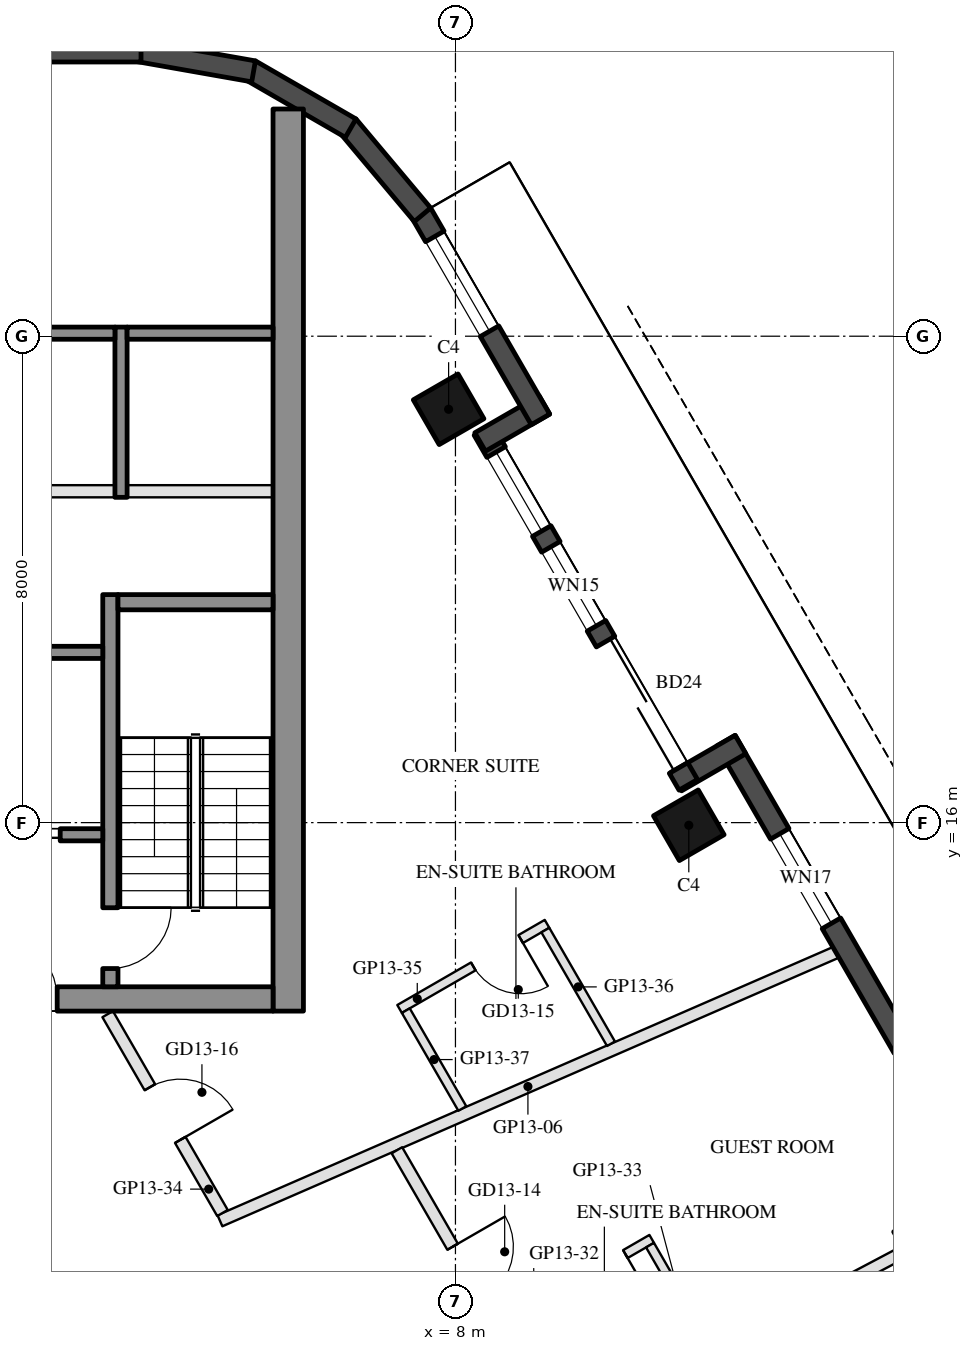
"""IFC4 building model, lengths in metres.
Left out: names, types, materials, properties, quantities, classifications, styles, units other than length and angle.
Written with IfcOpenShell. Run it as: python <this file> out.ifc"""

import sys

from ifc_helpers import new_model, si_unit, direction, frame, frame_2d, origin, origin_2d, place, context, subcontext, project, spatial, rectangle, hollow_rectangle, extrude, element, fill, save


model = new_model("IFC4")
c1 = context("Model", 3, precision=1e-05, world=origin(), true_north=direction((0.0, 1.0)))
c2 = subcontext(c1, "Body", "Model", "MODEL_VIEW")
j1 = project(units=[si_unit("LENGTHUNIT", "METRE"), si_unit("PLANEANGLEUNIT", "RADIAN")], contexts=[c1])
p1 = place(None, origin())
s1 = spatial("IfcSite", under=j1, at=p1, CompositionType="ELEMENT")
p2 = place(p1, origin())
s2 = spatial("IfcBuilding", under=s1, at=p2, CompositionType="ELEMENT")
p3 = place(p2, frame((0.0, 0.0, 157.7)))
s3 = spatial("IfcBuildingStorey", under=s2, at=p3, CompositionType="ELEMENT", Elevation=157.7)
for number, where, z_axis, x_axis in (
    (1, (15.788, 9.115, 0.0), (0.0, 0.0, 1.0), (-0.5, 0.866, 0.0)),
    (2, (11.838, 15.957, 0.0), (0.0, 0.0, 1.0), (-0.5, 0.866, 0.0)),
    (3, (7.888, 22.798, 0.0), (0.0, 0.0, 1.0), (-0.5, 0.866, 0.0)),
):
    element("IfcColumn", number, at=place(p3, frame(where, z_axis=z_axis, x_axis=x_axis)), inside=s3, PredefinedType="COLUMN", context=c2, shape_type="SweptSolid", body=[
        extrude(hollow_rectangle(XDim=0.85, YDim=0.85, WallThickness=0.04, at=origin_2d()), origin(), (0.0, 0.0, 1.0), 3.7),
    ])
p4 = place(p3, frame((17.299, 8.948, 0.0), z_axis=(0.0, 0.0, 1.0), x_axis=(-0.500010041276, 0.866019606374, 0.0)))
e4 = element("IfcWall", 4, at=p4, inside=s3, PredefinedType="SOLIDWALL", context=c2, shape_type="SweptSolid", body=[
    extrude(rectangle(XDim=9.7, YDim=0.35, at=frame_2d((4.85, 0.0))), origin(), (0.0, 0.0, 1.0), 3.55),
])
p5 = place(p4, frame((2.062, 0.0, 0.0)))
e5 = element("IfcOpeningElement", 5, at=p5, cuts=e4, PredefinedType="OPENING", context=c2, shape_type="SweptSolid", body=[
    extrude(rectangle(XDim=1.8, YDim=2.4, at=frame_2d((0.9, 1.2))), frame((0.0, 0.185, 0.0), z_axis=(0.0, -1.0, 0.0), x_axis=(1.0, 0.0, 0.0)), (0.0, 0.0, 1.0), 0.37),
])
p6 = place(p4, frame((6.23, 0.0, 0.3)))
e6 = element("IfcOpeningElement", 6, at=p6, cuts=e4, PredefinedType="OPENING", context=c2, shape_type="SweptSolid", body=[
    extrude(rectangle(XDim=1.7, YDim=2.65, at=frame_2d((0.85, 1.325))), frame((0.0, 0.185, 0.0), z_axis=(0.0, -1.0, 0.0), x_axis=(1.0, 0.0, 0.0)), (0.0, 0.0, 1.0), 0.37),
])
p7 = place(p3, frame((12.688, 17.284, 0.0), z_axis=(0.0, 0.0, 1.0), x_axis=(-0.865955602162, -0.500120880472, 0.0)))
e7 = element("IfcWall", 7, at=p7, inside=s3, PredefinedType="SOLIDWALL", context=c2, shape_type="SweptSolid", body=[
    extrude(rectangle(XDim=1.22, YDim=0.35, at=frame_2d((0.61, 0.0))), origin(), (0.0, 0.0, 1.0), 3.55),
])
p8 = place(p3, frame((11.829, 16.621, 0.0), z_axis=(0.0, 0.0, 1.0), x_axis=(-0.500003597184, 0.866023326939, 0.0)))
e8 = element("IfcWall", 8, at=p8, inside=s3, PredefinedType="SOLIDWALL", context=c2, shape_type="SweptSolid", body=[
    extrude(rectangle(XDim=6.74, YDim=0.35, at=frame_2d((3.37, 0.0))), origin(), (0.0, 0.0, 1.0), 3.55),
])
p9 = place(p8, frame((0.32, 0.0, 0.0)))
e9 = element("IfcOpeningElement", 9, at=p9, cuts=e8, PredefinedType="OPENING", context=c2, shape_type="SweptSolid", body=[
    extrude(rectangle(XDim=2.4, YDim=2.4, at=frame_2d((1.2, 1.2))), frame((0.0, 0.185, 0.0), z_axis=(0.0, -1.0, 0.0), x_axis=(1.0, 0.0, 0.0)), (0.0, 0.0, 1.0), 0.37),
])
p10 = place(p8, frame((3.02, 0.0, 0.3)))
e10 = element("IfcOpeningElement", 10, at=p10, cuts=e8, PredefinedType="OPENING", context=c2, shape_type="SweptSolid", body=[
    extrude(rectangle(XDim=1.5, YDim=2.65, at=frame_2d((0.75, 1.325))), frame((0.0, 0.185, 0.0), z_axis=(0.0, -1.0, 0.0), x_axis=(1.0, 0.0, 0.0)), (0.0, 0.0, 1.0), 0.37),
])
p11 = place(p8, frame((4.82, 0.0, 0.3)))
e11 = element("IfcOpeningElement", 11, at=p11, cuts=e8, PredefinedType="OPENING", context=c2, shape_type="SweptSolid", body=[
    extrude(rectangle(XDim=1.5, YDim=2.65, at=frame_2d((0.75, 1.325))), frame((0.0, 0.185, 0.0), z_axis=(0.0, -1.0, 0.0), x_axis=(1.0, 0.0, 0.0)), (0.0, 0.0, 1.0), 0.37),
])
p12 = place(p3, frame((8.406, 22.26, 0.0), z_axis=(0.0, 0.0, 1.0), x_axis=(0.865955602162, 0.500120880472, 0.0)))
e12 = element("IfcWall", 12, at=p12, inside=s3, PredefinedType="SOLIDWALL", context=c2, shape_type="SweptSolid", body=[
    extrude(rectangle(XDim=1.22, YDim=0.35, at=frame_2d((0.61, 0.0))), origin(), (0.0, 0.0, 1.0), 3.55),
])
p13 = place(p3, frame((9.398, 22.631, 0.0), z_axis=(0.0, 0.0, 1.0), x_axis=(-0.499954521343, 0.866051659307, 0.0)))
e13 = element("IfcWall", 13, at=p13, inside=s3, PredefinedType="SOLIDWALL", context=c2, shape_type="SweptSolid", body=[
    extrude(rectangle(XDim=3.916, YDim=0.35, at=frame_2d((1.958, 0.0))), origin(), (0.0, 0.0, 1.0), 3.55),
])
p14 = place(p13, frame((1.675, 0.0, 0.3)))
e14 = element("IfcOpeningElement", 14, at=p14, cuts=e13, PredefinedType="OPENING", context=c2, shape_type="SweptSolid", body=[
    extrude(rectangle(XDim=1.8, YDim=2.65, at=frame_2d((0.9, 1.325))), frame((0.0, 0.185, 0.0), z_axis=(0.0, -1.0, 0.0), x_axis=(1.0, 0.0, 0.0)), (0.0, 0.0, 1.0), 0.37),
])
p15 = place(p3, frame((7.458, 25.998, 0.0), z_axis=(0.0, 0.0, 1.0), x_axis=(-0.642808304945, 0.766027077259, 0.0)))
e15 = element("IfcWall", 15, at=p15, inside=s3, PredefinedType="SOLIDWALL", context=c2, shape_type="SweptSolid", body=[
    extrude(rectangle(XDim=1.91, YDim=0.35, at=frame_2d((0.955, 0.0))), origin(), (0.0, 0.0, 1.0), 3.55),
])
for number, where, z_axis, x_axis in (
    (16, (6.277, 27.422, 0.0), (0.0, 0.0, 1.0), (-0.866, 0.5, 0.0)),
    (17, (4.68, 28.356, 0.0), (0.0, 0.0, 1.0), (-0.985, 0.174, 0.0)),
):
    element("IfcWall", number, at=place(p3, frame(where, z_axis=z_axis, x_axis=x_axis)), inside=s3, PredefinedType="SOLIDWALL", context=c2, shape_type="SweptSolid", body=[
        extrude(rectangle(XDim=1.91, YDim=0.35, at=frame_2d((0.955, 0.0))), origin(), (0.0, 0.0, 1.0), 3.55),
    ])
p16 = place(p3, frame((2.829, 28.685, 0.0), z_axis=(0.0, 0.0, 1.0), x_axis=(-1.0, 0.0, 0.0)))
e18 = element("IfcWall", 18, at=p16, inside=s3, PredefinedType="SOLIDWALL", context=c2, shape_type="SweptSolid", body=[
    extrude(rectangle(XDim=5.658, YDim=0.35, at=frame_2d((2.829, 0.0))), origin(), (0.0, 0.0, 1.0), 3.55),
])
p17 = place(p3, frame((5.25, 12.9, 0.0), z_axis=(0.0, 0.0, 1.0), x_axis=(0.0, 1.0, 0.0)))
e19 = element("IfcWall", 19, at=p17, inside=s3, PredefinedType="SHEAR", context=c2, shape_type="SweptSolid", body=[
    extrude(rectangle(XDim=14.837, YDim=0.5, at=frame_2d((7.418, 0.0))), origin(), (0.0, 0.0, 1.0), 3.5),
])
p18 = place(p3, frame((5.0, 13.1, 0.0), z_axis=(0.0, 0.0, 1.0), x_axis=(-1.0, 0.0, 0.0)))
e20 = element("IfcWall", 20, at=p18, inside=s3, PredefinedType="SHEAR", context=c2, shape_type="SweptSolid", body=[
    extrude(rectangle(XDim=10.0, YDim=0.4, at=frame_2d((5.0, 0.0))), origin(), (0.0, 0.0, 1.0), 3.5),
])
p19 = place(p18, frame((3.55, 0.0, 0.0)))
e21 = element("IfcOpeningElement", 21, at=p19, cuts=e20, PredefinedType="OPENING", context=c2, shape_type="SweptSolid", body=[
    extrude(rectangle(XDim=1.1, YDim=2.1, at=frame_2d((0.55, 1.05))), frame((0.0, 0.21, 0.0), z_axis=(0.0, -1.0, 0.0), x_axis=(1.0, 0.0, 0.0)), (0.0, 0.0, 1.0), 0.42),
])
p20 = place(p18, frame((5.85, 0.0, 0.0)))
e22 = element("IfcOpeningElement", 22, at=p20, cuts=e20, PredefinedType="OPENING", context=c2, shape_type="SweptSolid", body=[
    extrude(rectangle(XDim=1.4, YDim=2.1, at=frame_2d((0.7, 1.05))), frame((0.0, 0.21, 0.0), z_axis=(0.0, -1.0, 0.0), x_axis=(1.0, 0.0, 0.0)), (0.0, 0.0, 1.0), 0.42),
])
p21 = place(p3, frame((2.325, 13.3, 0.0), z_axis=(0.0, 0.0, 1.0), x_axis=(0.0, 1.0, 0.0)))
e23 = element("IfcWall", 23, at=p21, inside=s3, PredefinedType="SHEAR", context=c2, shape_type="SweptSolid", body=[
    extrude(rectangle(XDim=6.45, YDim=0.25, at=frame_2d((3.225, 0.0))), origin(), (0.0, 0.0, 1.0), 3.5),
])
p22 = place(p21, frame((0.3, 0.0, 0.0)))
e24 = element("IfcOpeningElement", 24, at=p22, cuts=e23, PredefinedType="OPENING", context=c2, shape_type="SweptSolid", body=[
    extrude(rectangle(XDim=1.0, YDim=2.1, at=frame_2d((0.5, 1.05))), frame((0.0, 0.135, 0.0), z_axis=(0.0, -1.0, 0.0), x_axis=(1.0, 0.0, 0.0)), (0.0, 0.0, 1.0), 0.27),
])
p23 = place(p3, frame((5.0, 19.625, 0.0), z_axis=(0.0, 0.0, 1.0), x_axis=(-1.0, 0.0, 0.0)))
e25 = element("IfcWall", 25, at=p23, inside=s3, PredefinedType="SHEAR", context=c2, shape_type="SweptSolid", body=[
    extrude(rectangle(XDim=2.55, YDim=0.25, at=frame_2d((1.275, 0.0))), origin(), (0.0, 0.0, 1.0), 3.5),
])
p24 = place(p3, frame((2.2, 18.8, 0.0), z_axis=(0.0, 0.0, 1.0), x_axis=(-1.0, 0.0, 0.0)))
e26 = element("IfcWall", 26, at=p24, inside=s3, PredefinedType="SHEAR", context=c2, shape_type="SweptSolid", body=[
    extrude(rectangle(XDim=2.8, YDim=0.2, at=frame_2d((1.4, 0.0))), origin(), (0.0, 0.0, 1.0), 3.5),
])
p25 = place(p3, frame((2.2, 15.8, 0.0), z_axis=(0.0, 0.0, 1.0), x_axis=(-1.0, 0.0, 0.0)))
e27 = element("IfcWall", 27, at=p25, inside=s3, PredefinedType="SHEAR", context=c2, shape_type="SweptSolid", body=[
    extrude(rectangle(XDim=2.8, YDim=0.2, at=frame_2d((1.4, 0.0))), origin(), (0.0, 0.0, 1.0), 3.5),
])
p26 = place(p25, frame((0.7, 0.0, 0.0)))
e28 = element("IfcOpeningElement", 28, at=p26, cuts=e27, PredefinedType="OPENING", context=c2, shape_type="SweptSolid", body=[
    extrude(rectangle(XDim=1.2, YDim=2.1, at=frame_2d((0.6, 1.05))), frame((0.0, 0.11, 0.0), z_axis=(0.0, -1.0, 0.0), x_axis=(1.0, 0.0, 0.0)), (0.0, 0.0, 1.0), 0.22),
])
p27 = place(p3, frame((2.5, 21.35, 0.0), z_axis=(0.0, 0.0, 1.0), x_axis=(0.0, 1.0, 0.0)))
e29 = element("IfcWall", 29, at=p27, inside=s3, PredefinedType="SHEAR", context=c2, shape_type="SweptSolid", body=[
    extrude(rectangle(XDim=2.8, YDim=0.2, at=frame_2d((1.4, 0.0))), origin(), (0.0, 0.0, 1.0), 3.5),
])
p28 = place(p3, frame((5.0, 24.05, 0.0), z_axis=(0.0, 0.0, 1.0), x_axis=(-1.0, 0.0, 0.0)))
e30 = element("IfcWall", 30, at=p28, inside=s3, PredefinedType="SHEAR", context=c2, shape_type="SweptSolid", body=[
    extrude(rectangle(XDim=2.4, YDim=0.2, at=frame_2d((1.2, 0.0))), origin(), (0.0, 0.0, 1.0), 3.5),
])
p29 = place(p3, frame((2.4, 24.05, 0.0), z_axis=(0.0, 0.0, 1.0), x_axis=(-1.0, 0.0, 0.0)))
e31 = element("IfcWall", 31, at=p29, inside=s3, PredefinedType="SHEAR", context=c2, shape_type="SweptSolid", body=[
    extrude(rectangle(XDim=2.8, YDim=0.2, at=frame_2d((1.4, 0.0))), origin(), (0.0, 0.0, 1.0), 3.5),
])
p30 = place(p3, frame((5.0, 21.45, 0.0), z_axis=(0.0, 0.0, 1.0), x_axis=(-1.0, 0.0, 0.0)))
e32 = element("IfcWall", 32, at=p30, inside=s3, PredefinedType="PARTITIONING", context=c2, shape_type="SweptSolid", body=[
    extrude(rectangle(XDim=2.4, YDim=0.2, at=frame_2d((1.2, 0.0))), origin(), (0.0, 0.0, 1.0), 3.5),
])
p31 = place(p3, frame((2.4, 21.45, 0.0), z_axis=(0.0, 0.0, 1.0), x_axis=(-1.0, 0.0, 0.0)))
e33 = element("IfcWall", 33, at=p31, inside=s3, PredefinedType="PARTITIONING", context=c2, shape_type="SweptSolid", body=[
    extrude(rectangle(XDim=2.8, YDim=0.2, at=frame_2d((1.4, 0.0))), origin(), (0.0, 0.0, 1.0), 3.5),
])
p32 = place(p3, frame((15.392, 8.95, 0.0), z_axis=(0.0, 0.0, 1.0), x_axis=(-0.883969397176, -0.467544762408, 0.0)))
e34 = element("IfcWall", 34, at=p32, inside=s3, PredefinedType="PARTITIONING", context=c2, shape_type="SweptSolid", body=[
    extrude(rectangle(XDim=6.51, YDim=0.2, at=frame_2d((3.255, 0.0))), origin(), (0.0, 0.0, 1.0), 2.95),
])
p33 = place(p3, frame((14.257, 13.866, 0.0), z_axis=(0.0, 0.0, 1.0), x_axis=(-0.916761733334, -0.399434505638, 0.0)))
e35 = element("IfcWall", 35, at=p33, inside=s3, PredefinedType="PARTITIONING", context=c2, shape_type="SweptSolid", body=[
    extrude(rectangle(XDim=11.05, YDim=0.2, at=frame_2d((5.525, 0.0))), origin(), (0.0, 0.0, 1.0), 3.06),
])
p34 = place(p3, frame((7.037, 10.611, 0.0), z_axis=(0.0, 0.0, 1.0), x_axis=(0.500004030971, -0.86602307649, 0.0)))
e36 = element("IfcWall", 36, at=p34, inside=s3, PredefinedType="PARTITIONING", context=c2, shape_type="SweptSolid", body=[
    extrude(rectangle(XDim=5.279, YDim=0.2, at=frame_2d((2.639, 0.0))), origin(), (0.0, 0.0, 1.0), 2.95),
])
p35 = place(p34, frame((1.833, 0.0, 0.0)))
e37 = element("IfcOpeningElement", 37, at=p35, cuts=e36, PredefinedType="OPENING", context=c2, shape_type="SweptSolid", body=[
    extrude(rectangle(XDim=1.0, YDim=2.1, at=frame_2d((0.5, 1.05))), frame((0.0, 0.11, 0.0), z_axis=(0.0, -1.0, 0.0), x_axis=(1.0, 0.0, 0.0)), (0.0, 0.0, 1.0), 0.22),
])
p36 = place(p3, frame((11.227, 9.154, 0.0), z_axis=(0.0, 0.0, 1.0), x_axis=(-0.866034573852, -0.49998411664, 0.0)))
e38 = element("IfcWall", 38, at=p36, inside=s3, PredefinedType="PARTITIONING", context=c2, shape_type="SweptSolid", body=[
    extrude(rectangle(XDim=2.8, YDim=0.15, at=frame_2d((1.4, 0.0))), origin(), (0.0, 0.0, 1.0), 3.55),
])
p37 = place(p36, frame((0.5, 0.0, 0.0)))
e39 = element("IfcOpeningElement", 39, at=p37, cuts=e38, PredefinedType="OPENING", context=c2, shape_type="SweptSolid", body=[
    extrude(rectangle(XDim=0.9, YDim=2.1, at=frame_2d((0.45, 1.05))), frame((0.0, 0.085, 0.0), z_axis=(0.0, -1.0, 0.0), x_axis=(1.0, 0.0, 0.0)), (0.0, 0.0, 1.0), 0.17),
])
p38 = place(p3, frame((12.175, 7.362, 0.0), z_axis=(0.0, 0.0, 1.0), x_axis=(-0.500014901547, 0.866016800201, 0.0)))
e40 = element("IfcWall", 40, at=p38, inside=s3, PredefinedType="PARTITIONING", context=c2, shape_type="SweptSolid", body=[
    extrude(rectangle(XDim=1.951, YDim=0.15, at=frame_2d((0.976, 0.0))), origin(), (0.0, 0.0, 1.0), 3.55),
])
p39 = place(p3, frame((2.281, 12.85, 0.0), z_axis=(0.0, 0.0, 1.0), x_axis=(0.499991068497, -0.866030560329, 0.0)))
e41 = element("IfcWall", 41, at=p39, inside=s3, PredefinedType="PARTITIONING", context=c2, shape_type="SweptSolid", body=[
    extrude(rectangle(XDim=3.776, YDim=0.2, at=frame_2d((1.888, 0.0))), origin(), (0.0, 0.0, 1.0), 2.95),
])
p40 = place(p39, frame((1.388, 0.0, 0.0)))
e42 = element("IfcOpeningElement", 42, at=p40, cuts=e41, PredefinedType="OPENING", context=c2, shape_type="SweptSolid", body=[
    extrude(rectangle(XDim=1.0, YDim=2.1, at=frame_2d((0.5, 1.05))), frame((0.0, 0.11, 0.0), z_axis=(0.0, -1.0, 0.0), x_axis=(1.0, 0.0, 0.0)), (0.0, 0.0, 1.0), 0.22),
])
p41 = place(p3, frame((9.506, 14.335, 0.0), z_axis=(0.0, 0.0, 1.0), x_axis=(-0.866056369097, -0.49994636267, 0.0)))
e43 = element("IfcWall", 43, at=p41, inside=s3, PredefinedType="PARTITIONING", context=c2, shape_type="SweptSolid", body=[
    extrude(rectangle(XDim=2.8, YDim=0.15, at=frame_2d((1.4, 0.0))), origin(), (0.0, 0.0, 1.0), 3.55),
])
p42 = place(p41, frame((0.5, 0.0, 0.0)))
e44 = element("IfcOpeningElement", 44, at=p42, cuts=e43, PredefinedType="OPENING", context=c2, shape_type="SweptSolid", body=[
    extrude(rectangle(XDim=0.9, YDim=2.1, at=frame_2d((0.45, 1.05))), frame((0.0, 0.085, 0.0), z_axis=(0.0, -1.0, 0.0), x_axis=(1.0, 0.0, 0.0)), (0.0, 0.0, 1.0), 0.17),
])
p43 = place(p3, frame((10.558, 12.364, 0.0), z_axis=(0.0, 0.0, 1.0), x_axis=(-0.499983569942, 0.866034889475, 0.0)))
e45 = element("IfcWall", 45, at=p43, inside=s3, PredefinedType="PARTITIONING", context=c2, shape_type="SweptSolid", body=[
    extrude(rectangle(XDim=2.158, YDim=0.15, at=frame_2d((1.079, 0.0))), origin(), (0.0, 0.0, 1.0), 3.55),
])
p44 = place(p3, frame((8.113, 11.298, 0.0), z_axis=(0.0, 0.0, 1.0), x_axis=(-0.49995366312, 0.866052154742, 0.0)))
e46 = element("IfcWall", 46, at=p44, inside=s3, PredefinedType="PARTITIONING", context=c2, shape_type="SweptSolid", body=[
    extrude(rectangle(XDim=1.859, YDim=0.15, at=frame_2d((0.929, 0.0))), origin(), (0.0, 0.0, 1.0), 3.55),
])
p45 = place(p6, origin())
e47 = element("IfcWindow", 47, at=p45, inside=s3, PartitioningType="SINGLE_PANEL", PredefinedType="WINDOW", context=c2, shape_type="SweptSolid", body=[
    extrude(rectangle(XDim=1.7, YDim=2.65, at=frame_2d((0.85, 1.325))), frame((0.0, 0.03, 0.0), z_axis=(0.0, -1.0, 0.0), x_axis=(1.0, 0.0, 0.0)), (0.0, 0.0, 1.0), 0.06),
])
fill(e6, e47)
p46 = place(p9, frame((2.4, 0.0, 0.0), z_axis=(0.0, 0.0, 1.0), x_axis=(-1.0, 0.0, 0.0)))
e48 = element("IfcDoor", 48, at=p46, inside=s3, OperationType="SLIDING_TO_LEFT", PredefinedType="DOOR", context=c2, shape_type="SweptSolid", body=[
    extrude(rectangle(XDim=2.4, YDim=2.4, at=frame_2d((1.2, 1.2))), frame((0.0, 0.025, 0.0), z_axis=(0.0, -1.0, 0.0), x_axis=(1.0, 0.0, 0.0)), (0.0, 0.0, 1.0), 0.05),
])
fill(e9, e48)
p47 = place(p10, origin())
e49 = element("IfcWindow", 49, at=p47, inside=s3, PartitioningType="SINGLE_PANEL", PredefinedType="WINDOW", context=c2, shape_type="SweptSolid", body=[
    extrude(rectangle(XDim=1.5, YDim=2.65, at=frame_2d((0.75, 1.325))), frame((0.0, 0.03, 0.0), z_axis=(0.0, -1.0, 0.0), x_axis=(1.0, 0.0, 0.0)), (0.0, 0.0, 1.0), 0.06),
])
fill(e10, e49)
p48 = place(p11, origin())
e50 = element("IfcWindow", 50, at=p48, inside=s3, PartitioningType="SINGLE_PANEL", PredefinedType="WINDOW", context=c2, shape_type="SweptSolid", body=[
    extrude(rectangle(XDim=1.5, YDim=2.65, at=frame_2d((0.75, 1.325))), frame((0.0, 0.03, 0.0), z_axis=(0.0, -1.0, 0.0), x_axis=(1.0, 0.0, 0.0)), (0.0, 0.0, 1.0), 0.06),
])
fill(e11, e50)
p49 = place(p14, origin())
e51 = element("IfcWindow", 51, at=p49, inside=s3, PartitioningType="SINGLE_PANEL", PredefinedType="WINDOW", context=c2, shape_type="SweptSolid", body=[
    extrude(rectangle(XDim=1.8, YDim=2.65, at=frame_2d((0.9, 1.325))), frame((0.0, 0.03, 0.0), z_axis=(0.0, -1.0, 0.0), x_axis=(1.0, 0.0, 0.0)), (0.0, 0.0, 1.0), 0.06),
])
fill(e14, e51)
p50 = place(p26, origin())
e52 = element("IfcDoor", 52, at=p50, inside=s3, OperationType="DOUBLE_DOOR_SLIDING", PredefinedType="DOOR", context=c2, shape_type="SweptSolid", body=[
    extrude(rectangle(XDim=1.2, YDim=2.1, at=frame_2d((0.6, 1.05))), frame((0.0, 0.025, 0.0), z_axis=(0.0, -1.0, 0.0), x_axis=(1.0, 0.0, 0.0)), (0.0, 0.0, 1.0), 0.05),
])
fill(e28, e52)
p51 = place(p19, frame((1.1, 0.0, 0.0), z_axis=(0.0, 0.0, 1.0), x_axis=(-1.0, 0.0, 0.0)))
e53 = element("IfcDoor", 53, at=p51, inside=s3, OperationType="SINGLE_SWING_LEFT", PredefinedType="DOOR", context=c2, shape_type="SweptSolid", body=[
    extrude(rectangle(XDim=1.1, YDim=2.1, at=frame_2d((0.55, 1.05))), frame((0.0, 0.025, 0.0), z_axis=(0.0, -1.0, 0.0), x_axis=(1.0, 0.0, 0.0)), (0.0, 0.0, 1.0), 0.05),
])
fill(e21, e53)
p52 = place(p22, frame((1.0, 0.0, 0.0), z_axis=(0.0, 0.0, 1.0), x_axis=(-1.0, 0.0, 0.0)))
e54 = element("IfcDoor", 54, at=p52, inside=s3, OperationType="SINGLE_SWING_LEFT", PredefinedType="DOOR", context=c2, shape_type="SweptSolid", body=[
    extrude(rectangle(XDim=1.0, YDim=2.1, at=frame_2d((0.5, 1.05))), frame((0.0, 0.025, 0.0), z_axis=(0.0, -1.0, 0.0), x_axis=(1.0, 0.0, 0.0)), (0.0, 0.0, 1.0), 0.05),
])
fill(e24, e54)
p53 = place(p37, origin())
e55 = element("IfcDoor", 55, at=p53, inside=s3, OperationType="SINGLE_SWING_LEFT", PredefinedType="DOOR", context=c2, shape_type="SweptSolid", body=[
    extrude(rectangle(XDim=0.9, YDim=2.1, at=frame_2d((0.45, 1.05))), frame((0.0, 0.025, 0.0), z_axis=(0.0, -1.0, 0.0), x_axis=(1.0, 0.0, 0.0)), (0.0, 0.0, 1.0), 0.05),
])
fill(e39, e55)
p54 = place(p35, origin())
e56 = element("IfcDoor", 56, at=p54, inside=s3, OperationType="SINGLE_SWING_LEFT", PredefinedType="DOOR", context=c2, shape_type="SweptSolid", body=[
    extrude(rectangle(XDim=1.0, YDim=2.1, at=frame_2d((0.5, 1.05))), frame((0.0, 0.025, 0.0), z_axis=(0.0, -1.0, 0.0), x_axis=(1.0, 0.0, 0.0)), (0.0, 0.0, 1.0), 0.05),
])
fill(e37, e56)
p55 = place(p42, origin())
e57 = element("IfcDoor", 57, at=p55, inside=s3, OperationType="SINGLE_SWING_LEFT", PredefinedType="DOOR", context=c2, shape_type="SweptSolid", body=[
    extrude(rectangle(XDim=0.9, YDim=2.1, at=frame_2d((0.45, 1.05))), frame((0.0, 0.025, 0.0), z_axis=(0.0, -1.0, 0.0), x_axis=(1.0, 0.0, 0.0)), (0.0, 0.0, 1.0), 0.05),
])
fill(e44, e57)
p56 = place(p40, origin())
e58 = element("IfcDoor", 58, at=p56, inside=s3, OperationType="SINGLE_SWING_RIGHT", PredefinedType="DOOR", context=c2, shape_type="SweptSolid", body=[
    extrude(rectangle(XDim=1.0, YDim=2.1, at=frame_2d((0.5, 1.05))), frame((0.0, 0.025, 0.0), z_axis=(0.0, -1.0, 0.0), x_axis=(1.0, 0.0, 0.0)), (0.0, 0.0, 1.0), 0.05),
])
fill(e42, e58)
save(model, sys.argv[1])
